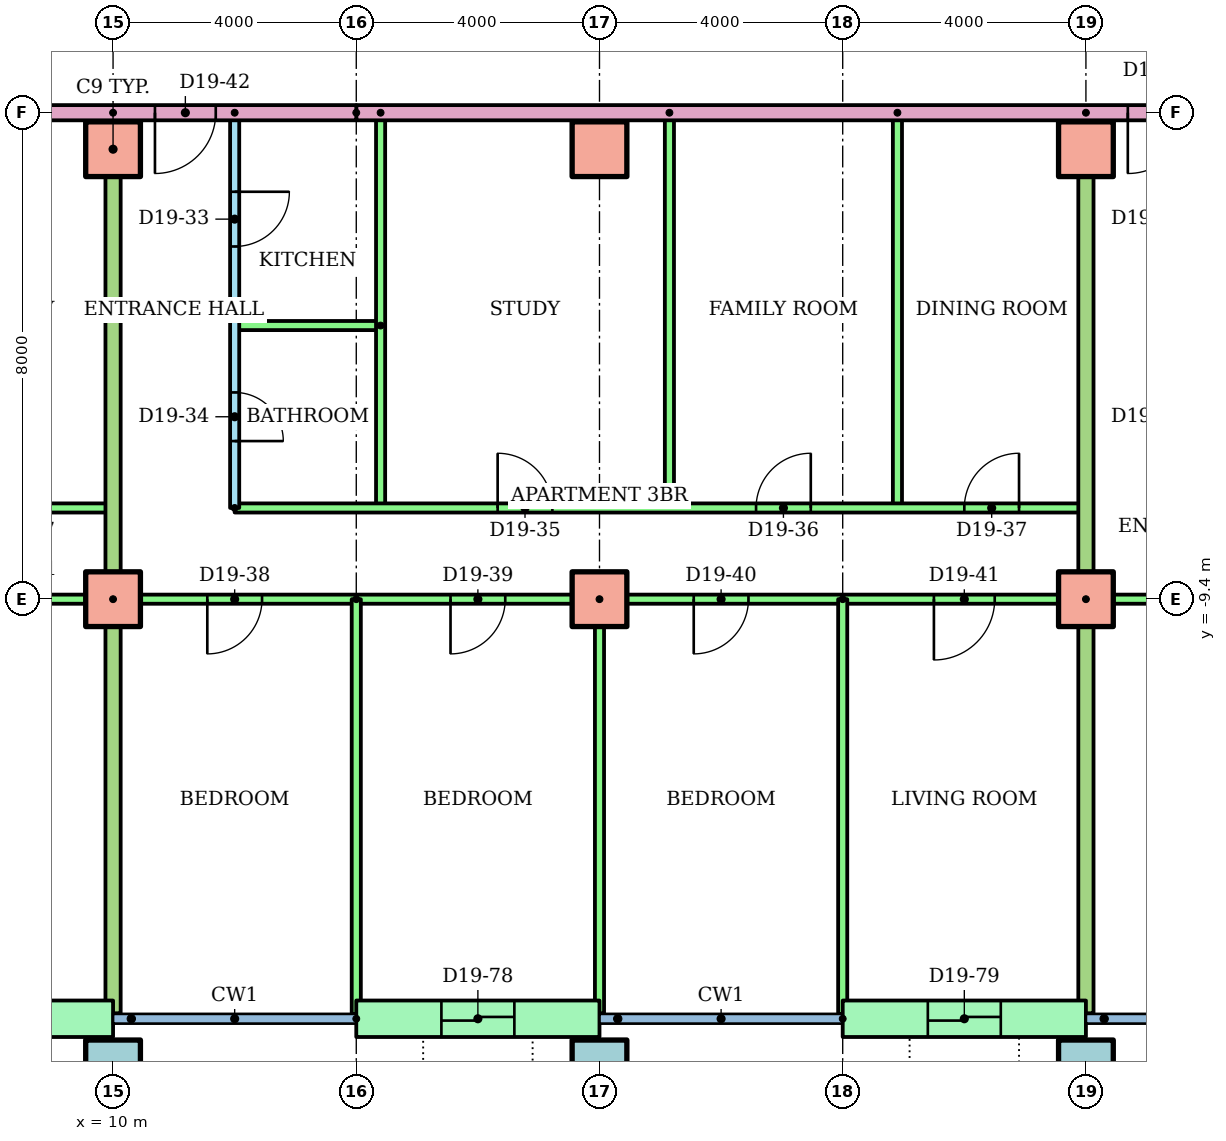
"""IFC4 building model, lengths in metres.
Left out: names, types, materials, properties, quantities, classifications, styles, units other than length and angle.
Written with IfcOpenShell. Run it as: python <this file> out.ifc"""

import sys

from ifc_helpers import new_model, si_unit, direction, frame, frame_2d, origin, origin_2d, place, context, subcontext, project, spatial, rectangle, hollow_rectangle, extrude, element, fill, save


model = new_model("IFC4")
c1 = context("Model", 3, precision=1e-05, world=origin(), true_north=direction((0.0, 1.0)))
c2 = subcontext(c1, "Body", "Model", "MODEL_VIEW")
j1 = project(units=[si_unit("LENGTHUNIT", "METRE"), si_unit("PLANEANGLEUNIT", "RADIAN")], contexts=[c1])
p1 = place(None, origin())
s1 = spatial("IfcSite", under=j1, at=p1, CompositionType="ELEMENT")
p2 = place(p1, origin())
s2 = spatial("IfcBuilding", under=s1, at=p2, CompositionType="ELEMENT")
p3 = place(p2, frame((0.0, 0.0, 77.5)))
s3 = spatial("IfcBuildingStorey", under=s2, at=p3, CompositionType="ELEMENT", Elevation=77.5)
for number, where in (
    (1, (10.0, -17.1, 0.0)),
    (2, (18.0, -17.1, 0.0)),
    (3, (26.0, -17.1, 0.0)),
):
    element("IfcColumn", number, at=place(p3, frame(where)), inside=s3, PredefinedType="COLUMN", context=c2, shape_type="SweptSolid", body=[
        extrude(hollow_rectangle(XDim=0.9, YDim=0.9, WallThickness=0.045, at=origin_2d()), origin(), (0.0, 0.0, 1.0), 3.2),
    ])
for number, where in (
    (4, (10.0, -9.4, 0.0)),
    (5, (18.0, -9.4, 0.0)),
    (6, (26.0, -9.4, 0.0)),
    (7, (10.0, -2.0, 0.0)),
    (8, (18.0, -2.0, 0.0)),
    (9, (26.0, -2.0, 0.0)),
):
    element("IfcColumn", number, at=place(p3, frame(where)), inside=s3, PredefinedType="COLUMN", context=c2, shape_type="SweptSolid", body=[
        extrude(rectangle(XDim=0.9, YDim=0.9, at=origin_2d()), origin(), (0.0, 0.0, 1.0), 3.2),
    ])
p4 = place(p3, frame((6.0, -16.3, 0.0)))
e10 = element("IfcWall", 10, at=p4, inside=s3, PredefinedType="STANDARD", context=c2, shape_type="SweptSolid", body=[
    extrude(rectangle(XDim=4.0, YDim=0.6, at=frame_2d((2.0, 0.0))), origin(), (0.0, 0.0, 1.0), 2.92),
])
p5 = place(p4, frame((1.4, 0.0, 0.0)))
e11 = element("IfcOpeningElement", 11, at=p5, cuts=e10, PredefinedType="OPENING", context=c2, shape_type="SweptSolid", body=[
    extrude(rectangle(XDim=1.2, YDim=2.1, at=frame_2d((0.6, 1.05))), frame((0.0, 0.31, 0.0), z_axis=(0.0, -1.0, 0.0), x_axis=(1.0, 0.0, 0.0)), (0.0, 0.0, 1.0), 0.62),
])
p6 = place(p3, frame((14.0, -16.3, 0.0)))
e12 = element("IfcWall", 12, at=p6, inside=s3, PredefinedType="STANDARD", context=c2, shape_type="SweptSolid", body=[
    extrude(rectangle(XDim=4.0, YDim=0.6, at=frame_2d((2.0, 0.0))), origin(), (0.0, 0.0, 1.0), 2.92),
])
p7 = place(p6, frame((1.4, 0.0, 0.0)))
e13 = element("IfcOpeningElement", 13, at=p7, cuts=e12, PredefinedType="OPENING", context=c2, shape_type="SweptSolid", body=[
    extrude(rectangle(XDim=1.2, YDim=2.1, at=frame_2d((0.6, 1.05))), frame((0.0, 0.31, 0.0), z_axis=(0.0, -1.0, 0.0), x_axis=(1.0, 0.0, 0.0)), (0.0, 0.0, 1.0), 0.62),
])
p8 = place(p3, frame((22.0, -16.3, 0.0)))
e14 = element("IfcWall", 14, at=p8, inside=s3, PredefinedType="STANDARD", context=c2, shape_type="SweptSolid", body=[
    extrude(rectangle(XDim=4.0, YDim=0.6, at=frame_2d((2.0, 0.0))), origin(), (0.0, 0.0, 1.0), 2.92),
])
p9 = place(p8, frame((1.4, 0.0, 0.0)))
e15 = element("IfcOpeningElement", 15, at=p9, cuts=e14, PredefinedType="OPENING", context=c2, shape_type="SweptSolid", body=[
    extrude(rectangle(XDim=1.2, YDim=2.1, at=frame_2d((0.6, 1.05))), frame((0.0, 0.31, 0.0), z_axis=(0.0, -1.0, 0.0), x_axis=(1.0, 0.0, 0.0)), (0.0, 0.0, 1.0), 0.62),
])
p10 = place(p3, frame((-4.0, -7.9, 0.0)))
e16 = element("IfcWall", 16, at=p10, inside=s3, PredefinedType="PARTITIONING", context=c2, shape_type="SweptSolid", body=[
    extrude(rectangle(XDim=14.0, YDim=0.15, at=frame_2d((7.0, 0.0))), origin(), (0.0, 0.0, 1.0), 2.4),
])
p11 = place(p10, frame((4.325, 0.0, 0.0)))
e17 = element("IfcOpeningElement", 17, at=p11, cuts=e16, PredefinedType="OPENING", context=c2, shape_type="SweptSolid", body=[
    extrude(rectangle(XDim=0.9, YDim=2.1, at=frame_2d((0.45, 1.05))), frame((0.0, 0.085, 0.0), z_axis=(0.0, -1.0, 0.0), x_axis=(1.0, 0.0, 0.0)), (0.0, 0.0, 1.0), 0.17),
])
p12 = place(p10, frame((8.575, 0.0, 0.0)))
e18 = element("IfcOpeningElement", 18, at=p12, cuts=e16, PredefinedType="OPENING", context=c2, shape_type="SweptSolid", body=[
    extrude(rectangle(XDim=0.9, YDim=2.1, at=frame_2d((0.45, 1.05))), frame((0.0, 0.085, 0.0), z_axis=(0.0, -1.0, 0.0), x_axis=(1.0, 0.0, 0.0)), (0.0, 0.0, 1.0), 0.17),
])
p13 = place(p10, frame((12.0, 0.0, 0.0)))
e19 = element("IfcOpeningElement", 19, at=p13, cuts=e16, PredefinedType="OPENING", context=c2, shape_type="SweptSolid", body=[
    extrude(rectangle(XDim=0.9, YDim=2.1, at=frame_2d((0.45, 1.05))), frame((0.0, 0.085, 0.0), z_axis=(0.0, -1.0, 0.0), x_axis=(1.0, 0.0, 0.0)), (0.0, 0.0, 1.0), 0.17),
])
p14 = place(p3, frame((10.0, -9.4, 0.0), z_axis=(0.0, 0.0, 1.0), x_axis=(-1.0, 0.0, 0.0)))
e20 = element("IfcWall", 20, at=p14, inside=s3, PredefinedType="PARTITIONING", context=c2, shape_type="SweptSolid", body=[
    extrude(rectangle(XDim=16.0, YDim=0.15, at=frame_2d((8.0, 0.0))), origin(), (0.0, 0.0, 1.0), 2.4),
])
p15 = place(p14, frame((13.55, 0.0, 0.0)))
e21 = element("IfcOpeningElement", 21, at=p15, cuts=e20, PredefinedType="OPENING", context=c2, shape_type="SweptSolid", body=[
    extrude(rectangle(XDim=0.9, YDim=2.1, at=frame_2d((0.45, 1.05))), frame((0.0, 0.085, 0.0), z_axis=(0.0, -1.0, 0.0), x_axis=(1.0, 0.0, 0.0)), (0.0, 0.0, 1.0), 0.17),
])
p16 = place(p14, frame((9.5, 0.0, 0.0)))
e22 = element("IfcOpeningElement", 22, at=p16, cuts=e20, PredefinedType="OPENING", context=c2, shape_type="SweptSolid", body=[
    extrude(rectangle(XDim=1.0, YDim=2.1, at=frame_2d((0.5, 1.05))), frame((0.0, 0.085, 0.0), z_axis=(0.0, -1.0, 0.0), x_axis=(1.0, 0.0, 0.0)), (0.0, 0.0, 1.0), 0.17),
])
p17 = place(p14, frame((5.55, 0.0, 0.0)))
e23 = element("IfcOpeningElement", 23, at=p17, cuts=e20, PredefinedType="OPENING", context=c2, shape_type="SweptSolid", body=[
    extrude(rectangle(XDim=0.9, YDim=2.1, at=frame_2d((0.45, 1.05))), frame((0.0, 0.085, 0.0), z_axis=(0.0, -1.0, 0.0), x_axis=(1.0, 0.0, 0.0)), (0.0, 0.0, 1.0), 0.17),
])
p18 = place(p14, frame((1.55, 0.0, 0.0)))
e24 = element("IfcOpeningElement", 24, at=p18, cuts=e20, PredefinedType="OPENING", context=c2, shape_type="SweptSolid", body=[
    extrude(rectangle(XDim=0.9, YDim=2.1, at=frame_2d((0.45, 1.05))), frame((0.0, 0.085, 0.0), z_axis=(0.0, -1.0, 0.0), x_axis=(1.0, 0.0, 0.0)), (0.0, 0.0, 1.0), 0.17),
])
p19 = place(p3, frame((12.0, -1.4, 0.0), z_axis=(0.0, 0.0, 1.0), x_axis=(0.0, -1.0, 0.0)))
e25 = element("IfcWall", 25, at=p19, inside=s3, PredefinedType="PARTITIONING", context=c2, shape_type="SweptSolid", body=[
    extrude(rectangle(XDim=6.5, YDim=0.15, at=frame_2d((3.25, 0.0))), origin(), (0.0, 0.0, 1.0), 2.4),
])
p20 = place(p19, frame((1.3, 0.0, 0.0)))
e26 = element("IfcOpeningElement", 26, at=p20, cuts=e25, PredefinedType="OPENING", context=c2, shape_type="SweptSolid", body=[
    extrude(rectangle(XDim=0.9, YDim=2.1, at=frame_2d((0.45, 1.05))), frame((0.0, 0.085, 0.0), z_axis=(0.0, -1.0, 0.0), x_axis=(1.0, 0.0, 0.0)), (0.0, 0.0, 1.0), 0.17),
])
p21 = place(p19, frame((4.6, 0.0, 0.0)))
e27 = element("IfcOpeningElement", 27, at=p21, cuts=e25, PredefinedType="OPENING", context=c2, shape_type="SweptSolid", body=[
    extrude(rectangle(XDim=0.8, YDim=2.1, at=frame_2d((0.4, 1.05))), frame((0.0, 0.085, 0.0), z_axis=(0.0, -1.0, 0.0), x_axis=(1.0, 0.0, 0.0)), (0.0, 0.0, 1.0), 0.17),
])
p22 = place(p3, frame((14.4, -4.9, 0.0), z_axis=(0.0, 0.0, 1.0), x_axis=(-1.0, 0.0, 0.0)))
e28 = element("IfcWall", 28, at=p22, inside=s3, PredefinedType="PARTITIONING", context=c2, shape_type="SweptSolid", body=[
    extrude(rectangle(XDim=2.4, YDim=0.15, at=frame_2d((1.2, 0.0))), origin(), (0.0, 0.0, 1.0), 2.4),
])
for number, where, z_axis, x_axis in (
    (29, (14.4, -1.4, 0.0), (0.0, 0.0, 1.0), (0.0, -1.0, 0.0)),
    (30, (19.15, -1.4, 0.0), (0.0, 0.0, 1.0), (0.0, -1.0, 0.0)),
    (31, (22.9, -1.4, 0.0), (0.0, 0.0, 1.0), (0.0, -1.0, 0.0)),
):
    element("IfcWall", number, at=place(p3, frame(where, z_axis=z_axis, x_axis=x_axis)), inside=s3, PredefinedType="PARTITIONING", context=c2, shape_type="SweptSolid", body=[
        extrude(rectangle(XDim=6.5, YDim=0.15, at=frame_2d((3.25, 0.0))), origin(), (0.0, 0.0, 1.0), 2.4),
    ])
p23 = place(p3, frame((12.0, -7.9, 0.0)))
e32 = element("IfcWall", 32, at=p23, inside=s3, PredefinedType="PARTITIONING", context=c2, shape_type="SweptSolid", body=[
    extrude(rectangle(XDim=14.0, YDim=0.15, at=frame_2d((7.0, 0.0))), origin(), (0.0, 0.0, 1.0), 2.4),
])
p24 = place(p23, frame((4.325, 0.0, 0.0)))
e33 = element("IfcOpeningElement", 33, at=p24, cuts=e32, PredefinedType="OPENING", context=c2, shape_type="SweptSolid", body=[
    extrude(rectangle(XDim=0.9, YDim=2.1, at=frame_2d((0.45, 1.05))), frame((0.0, 0.085, 0.0), z_axis=(0.0, -1.0, 0.0), x_axis=(1.0, 0.0, 0.0)), (0.0, 0.0, 1.0), 0.17),
])
p25 = place(p23, frame((8.575, 0.0, 0.0)))
e34 = element("IfcOpeningElement", 34, at=p25, cuts=e32, PredefinedType="OPENING", context=c2, shape_type="SweptSolid", body=[
    extrude(rectangle(XDim=0.9, YDim=2.1, at=frame_2d((0.45, 1.05))), frame((0.0, 0.085, 0.0), z_axis=(0.0, -1.0, 0.0), x_axis=(1.0, 0.0, 0.0)), (0.0, 0.0, 1.0), 0.17),
])
p26 = place(p23, frame((12.0, 0.0, 0.0)))
e35 = element("IfcOpeningElement", 35, at=p26, cuts=e32, PredefinedType="OPENING", context=c2, shape_type="SweptSolid", body=[
    extrude(rectangle(XDim=0.9, YDim=2.1, at=frame_2d((0.45, 1.05))), frame((0.0, 0.085, 0.0), z_axis=(0.0, -1.0, 0.0), x_axis=(1.0, 0.0, 0.0)), (0.0, 0.0, 1.0), 0.17),
])
p27 = place(p3, frame((26.0, -9.4, 0.0), z_axis=(0.0, 0.0, 1.0), x_axis=(-1.0, 0.0, 0.0)))
e36 = element("IfcWall", 36, at=p27, inside=s3, PredefinedType="PARTITIONING", context=c2, shape_type="SweptSolid", body=[
    extrude(rectangle(XDim=16.0, YDim=0.15, at=frame_2d((8.0, 0.0))), origin(), (0.0, 0.0, 1.0), 2.4),
])
p28 = place(p27, frame((13.55, 0.0, 0.0)))
e37 = element("IfcOpeningElement", 37, at=p28, cuts=e36, PredefinedType="OPENING", context=c2, shape_type="SweptSolid", body=[
    extrude(rectangle(XDim=0.9, YDim=2.1, at=frame_2d((0.45, 1.05))), frame((0.0, 0.085, 0.0), z_axis=(0.0, -1.0, 0.0), x_axis=(1.0, 0.0, 0.0)), (0.0, 0.0, 1.0), 0.17),
])
p29 = place(p27, frame((9.55, 0.0, 0.0)))
e38 = element("IfcOpeningElement", 38, at=p29, cuts=e36, PredefinedType="OPENING", context=c2, shape_type="SweptSolid", body=[
    extrude(rectangle(XDim=0.9, YDim=2.1, at=frame_2d((0.45, 1.05))), frame((0.0, 0.085, 0.0), z_axis=(0.0, -1.0, 0.0), x_axis=(1.0, 0.0, 0.0)), (0.0, 0.0, 1.0), 0.17),
])
p30 = place(p27, frame((5.55, 0.0, 0.0)))
e39 = element("IfcOpeningElement", 39, at=p30, cuts=e36, PredefinedType="OPENING", context=c2, shape_type="SweptSolid", body=[
    extrude(rectangle(XDim=0.9, YDim=2.1, at=frame_2d((0.45, 1.05))), frame((0.0, 0.085, 0.0), z_axis=(0.0, -1.0, 0.0), x_axis=(1.0, 0.0, 0.0)), (0.0, 0.0, 1.0), 0.17),
])
p31 = place(p27, frame((1.5, 0.0, 0.0)))
e40 = element("IfcOpeningElement", 40, at=p31, cuts=e36, PredefinedType="OPENING", context=c2, shape_type="SweptSolid", body=[
    extrude(rectangle(XDim=1.0, YDim=2.1, at=frame_2d((0.5, 1.05))), frame((0.0, 0.085, 0.0), z_axis=(0.0, -1.0, 0.0), x_axis=(1.0, 0.0, 0.0)), (0.0, 0.0, 1.0), 0.17),
])
p32 = place(p3, frame((14.0, -9.4, 0.0), z_axis=(0.0, 0.0, 1.0), x_axis=(0.0, -1.0, 0.0)))
e41 = element("IfcWall", 41, at=p32, inside=s3, PredefinedType="PARTITIONING", context=c2, shape_type="SweptSolid", body=[
    extrude(rectangle(XDim=6.821, YDim=0.15, at=frame_2d((3.411, 0.0))), origin(), (0.0, 0.0, 1.0), 2.4),
])
p33 = place(p3, frame((18.0, -9.4, 0.0), z_axis=(0.0, 0.0, 1.0), x_axis=(0.0, -1.0, 0.0)))
e42 = element("IfcWall", 42, at=p33, inside=s3, PredefinedType="PARTITIONING", context=c2, shape_type="SweptSolid", body=[
    extrude(rectangle(XDim=6.81, YDim=0.15, at=frame_2d((3.405, 0.0))), origin(), (0.0, 0.0, 1.0), 2.4),
])
p34 = place(p3, frame((22.0, -9.4, 0.0), z_axis=(0.0, 0.0, 1.0), x_axis=(0.0, -1.0, 0.0)))
e43 = element("IfcWall", 43, at=p34, inside=s3, PredefinedType="PARTITIONING", context=c2, shape_type="SweptSolid", body=[
    extrude(rectangle(XDim=6.821, YDim=0.15, at=frame_2d((3.411, 0.0))), origin(), (0.0, 0.0, 1.0), 2.4),
])
p35 = place(p3, frame((10.0, -1.4, 0.0), z_axis=(0.0, 0.0, 1.0), x_axis=(0.0, -1.0, 0.0)))
e44 = element("IfcWall", 44, at=p35, inside=s3, PredefinedType="PARTITIONING", context=c2, shape_type="SweptSolid", body=[
    extrude(rectangle(XDim=14.81, YDim=0.25, at=frame_2d((7.405, 0.0))), origin(), (0.0, 0.0, 1.0), 2.4),
])
p36 = place(p3, frame((40.62, -9.4, 0.0), z_axis=(0.0, 0.0, 1.0), x_axis=(-1.0, 0.0, 0.0)))
e45 = element("IfcWall", 45, at=p36, inside=s3, PredefinedType="PARTITIONING", context=c2, shape_type="SweptSolid", body=[
    extrude(rectangle(XDim=14.62, YDim=0.15, at=frame_2d((7.31, 0.0))), origin(), (0.0, 0.0, 1.0), 2.4),
])
p37 = place(p36, frame((10.12, 0.0, 0.0)))
e46 = element("IfcOpeningElement", 46, at=p37, cuts=e45, PredefinedType="OPENING", context=c2, shape_type="SweptSolid", body=[
    extrude(rectangle(XDim=1.0, YDim=2.1, at=frame_2d((0.5, 1.05))), frame((0.0, 0.085, 0.0), z_axis=(0.0, -1.0, 0.0), x_axis=(1.0, 0.0, 0.0)), (0.0, 0.0, 1.0), 0.17),
])
p38 = place(p36, frame((2.97, 0.0, 0.0)))
e47 = element("IfcOpeningElement", 47, at=p38, cuts=e45, PredefinedType="OPENING", context=c2, shape_type="SweptSolid", body=[
    extrude(rectangle(XDim=0.9, YDim=2.1, at=frame_2d((0.45, 1.05))), frame((0.0, 0.085, 0.0), z_axis=(0.0, -1.0, 0.0), x_axis=(1.0, 0.0, 0.0)), (0.0, 0.0, 1.0), 0.17),
])
p39 = place(p3, frame((26.0, -1.4, 0.0), z_axis=(0.0, 0.0, 1.0), x_axis=(0.0, -1.0, 0.0)))
e48 = element("IfcWall", 48, at=p39, inside=s3, PredefinedType="PARTITIONING", context=c2, shape_type="SweptSolid", body=[
    extrude(rectangle(XDim=14.81, YDim=0.25, at=frame_2d((7.405, 0.0))), origin(), (0.0, 0.0, 1.0), 2.4),
])
p40 = place(p3, frame((29.0, -1.4, 0.0), z_axis=(0.0, 0.0, 1.0), x_axis=(-1.0, 0.0, 0.0)))
e49 = element("IfcWall", 49, at=p40, inside=s3, PredefinedType="PARTITIONING", context=c2, shape_type="SweptSolid", body=[
    extrude(rectangle(XDim=15.0, YDim=0.25, at=frame_2d((7.5, 0.0))), origin(), (0.0, 0.0, 1.0), 2.4),
])
p41 = place(p40, frame((1.311, 0.0, 0.0)))
e50 = element("IfcOpeningElement", 50, at=p41, cuts=e49, PredefinedType="OPENING", context=c2, shape_type="SweptSolid", body=[
    extrude(rectangle(XDim=1.0, YDim=2.1, at=frame_2d((0.5, 1.05))), frame((0.0, 0.135, 0.0), z_axis=(0.0, -1.0, 0.0), x_axis=(1.0, 0.0, 0.0)), (0.0, 0.0, 1.0), 0.27),
])
p42 = place(p3, frame((14.0, -1.4, 0.0), z_axis=(0.0, 0.0, 1.0), x_axis=(-1.0, 0.0, 0.0)))
e51 = element("IfcWall", 51, at=p42, inside=s3, PredefinedType="PARTITIONING", context=c2, shape_type="SweptSolid", body=[
    extrude(rectangle(XDim=28.0, YDim=0.25, at=frame_2d((14.0, 0.0))), origin(), (0.0, 0.0, 1.0), 2.4),
])
p43 = place(p42, frame((20.689, 0.0, 0.0)))
e52 = element("IfcOpeningElement", 52, at=p43, cuts=e51, PredefinedType="OPENING", context=c2, shape_type="SweptSolid", body=[
    extrude(rectangle(XDim=1.0, YDim=2.1, at=frame_2d((0.5, 1.05))), frame((0.0, 0.135, 0.0), z_axis=(0.0, -1.0, 0.0), x_axis=(1.0, 0.0, 0.0)), (0.0, 0.0, 1.0), 0.27),
])
p44 = place(p42, frame((18.311, 0.0, 0.0)))
e53 = element("IfcOpeningElement", 53, at=p44, cuts=e51, PredefinedType="OPENING", context=c2, shape_type="SweptSolid", body=[
    extrude(rectangle(XDim=1.0, YDim=2.1, at=frame_2d((0.5, 1.05))), frame((0.0, 0.135, 0.0), z_axis=(0.0, -1.0, 0.0), x_axis=(1.0, 0.0, 0.0)), (0.0, 0.0, 1.0), 0.27),
])
p45 = place(p42, frame((2.311, 0.0, 0.0)))
e54 = element("IfcOpeningElement", 54, at=p45, cuts=e51, PredefinedType="OPENING", context=c2, shape_type="SweptSolid", body=[
    extrude(rectangle(XDim=1.0, YDim=2.1, at=frame_2d((0.5, 1.05))), frame((0.0, 0.135, 0.0), z_axis=(0.0, -1.0, 0.0), x_axis=(1.0, 0.0, 0.0)), (0.0, 0.0, 1.0), 0.27),
])
p46 = place(p20, origin())
e55 = element("IfcDoor", 55, at=p46, inside=s3, OperationType="SINGLE_SWING_LEFT", PredefinedType="DOOR", context=c2, shape_type="SweptSolid", body=[
    extrude(rectangle(XDim=0.9, YDim=2.1, at=frame_2d((0.45, 1.05))), frame((0.0, 0.025, 0.0), z_axis=(0.0, -1.0, 0.0), x_axis=(1.0, 0.0, 0.0)), (0.0, 0.0, 1.0), 0.05),
])
fill(e26, e55)
p47 = place(p21, origin())
e56 = element("IfcDoor", 56, at=p47, inside=s3, OperationType="SINGLE_SWING_RIGHT", PredefinedType="DOOR", context=c2, shape_type="SweptSolid", body=[
    extrude(rectangle(XDim=0.8, YDim=2.1, at=frame_2d((0.4, 1.05))), frame((0.0, 0.025, 0.0), z_axis=(0.0, -1.0, 0.0), x_axis=(1.0, 0.0, 0.0)), (0.0, 0.0, 1.0), 0.05),
])
fill(e27, e56)
p48 = place(p24, origin())
e57 = element("IfcDoor", 57, at=p48, inside=s3, OperationType="SINGLE_SWING_LEFT", PredefinedType="DOOR", context=c2, shape_type="SweptSolid", body=[
    extrude(rectangle(XDim=0.9, YDim=2.1, at=frame_2d((0.45, 1.05))), frame((0.0, 0.025, 0.0), z_axis=(0.0, -1.0, 0.0), x_axis=(1.0, 0.0, 0.0)), (0.0, 0.0, 1.0), 0.05),
])
fill(e33, e57)
p49 = place(p25, origin())
e58 = element("IfcDoor", 58, at=p49, inside=s3, OperationType="SINGLE_SWING_RIGHT", PredefinedType="DOOR", context=c2, shape_type="SweptSolid", body=[
    extrude(rectangle(XDim=0.9, YDim=2.1, at=frame_2d((0.45, 1.05))), frame((0.0, 0.025, 0.0), z_axis=(0.0, -1.0, 0.0), x_axis=(1.0, 0.0, 0.0)), (0.0, 0.0, 1.0), 0.05),
])
fill(e34, e58)
p50 = place(p26, origin())
e59 = element("IfcDoor", 59, at=p50, inside=s3, OperationType="SINGLE_SWING_RIGHT", PredefinedType="DOOR", context=c2, shape_type="SweptSolid", body=[
    extrude(rectangle(XDim=0.9, YDim=2.1, at=frame_2d((0.45, 1.05))), frame((0.0, 0.025, 0.0), z_axis=(0.0, -1.0, 0.0), x_axis=(1.0, 0.0, 0.0)), (0.0, 0.0, 1.0), 0.05),
])
fill(e35, e59)
p51 = place(p28, origin())
e60 = element("IfcDoor", 60, at=p51, inside=s3, OperationType="SINGLE_SWING_RIGHT", PredefinedType="DOOR", context=c2, shape_type="SweptSolid", body=[
    extrude(rectangle(XDim=0.9, YDim=2.1, at=frame_2d((0.45, 1.05))), frame((0.0, 0.025, 0.0), z_axis=(0.0, -1.0, 0.0), x_axis=(1.0, 0.0, 0.0)), (0.0, 0.0, 1.0), 0.05),
])
fill(e37, e60)
p52 = place(p29, origin())
e61 = element("IfcDoor", 61, at=p52, inside=s3, OperationType="SINGLE_SWING_RIGHT", PredefinedType="DOOR", context=c2, shape_type="SweptSolid", body=[
    extrude(rectangle(XDim=0.9, YDim=2.1, at=frame_2d((0.45, 1.05))), frame((0.0, 0.025, 0.0), z_axis=(0.0, -1.0, 0.0), x_axis=(1.0, 0.0, 0.0)), (0.0, 0.0, 1.0), 0.05),
])
fill(e38, e61)
p53 = place(p30, origin())
e62 = element("IfcDoor", 62, at=p53, inside=s3, OperationType="SINGLE_SWING_RIGHT", PredefinedType="DOOR", context=c2, shape_type="SweptSolid", body=[
    extrude(rectangle(XDim=0.9, YDim=2.1, at=frame_2d((0.45, 1.05))), frame((0.0, 0.025, 0.0), z_axis=(0.0, -1.0, 0.0), x_axis=(1.0, 0.0, 0.0)), (0.0, 0.0, 1.0), 0.05),
])
fill(e39, e62)
p54 = place(p31, origin())
e63 = element("IfcDoor", 63, at=p54, inside=s3, OperationType="SINGLE_SWING_RIGHT", PredefinedType="DOOR", context=c2, shape_type="SweptSolid", body=[
    extrude(rectangle(XDim=1.0, YDim=2.1, at=frame_2d((0.5, 1.05))), frame((0.0, 0.025, 0.0), z_axis=(0.0, -1.0, 0.0), x_axis=(1.0, 0.0, 0.0)), (0.0, 0.0, 1.0), 0.05),
])
fill(e40, e63)
p55 = place(p45, origin())
e64 = element("IfcDoor", 64, at=p55, inside=s3, OperationType="SINGLE_SWING_RIGHT", PredefinedType="DOOR", context=c2, shape_type="SweptSolid", body=[
    extrude(rectangle(XDim=1.0, YDim=2.1, at=frame_2d((0.5, 1.05))), frame((0.0, 0.025, 0.0), z_axis=(0.0, -1.0, 0.0), x_axis=(1.0, 0.0, 0.0)), (0.0, 0.0, 1.0), 0.05),
])
fill(e54, e64)
p56 = place(p41, origin())
e65 = element("IfcDoor", 65, at=p56, inside=s3, OperationType="SINGLE_SWING_RIGHT", PredefinedType="DOOR", context=c2, shape_type="SweptSolid", body=[
    extrude(rectangle(XDim=1.0, YDim=2.1, at=frame_2d((0.5, 1.05))), frame((0.0, 0.025, 0.0), z_axis=(0.0, -1.0, 0.0), x_axis=(1.0, 0.0, 0.0)), (0.0, 0.0, 1.0), 0.05),
])
fill(e50, e65)
p57 = place(p7, origin())
e66 = element("IfcDoor", 66, at=p57, inside=s3, OperationType="SLIDING_TO_LEFT", PredefinedType="DOOR", context=c2, shape_type="SweptSolid", body=[
    extrude(rectangle(XDim=1.2, YDim=2.1, at=frame_2d((0.6, 1.05))), frame((0.0, 0.025, 0.0), z_axis=(0.0, -1.0, 0.0), x_axis=(1.0, 0.0, 0.0)), (0.0, 0.0, 1.0), 0.05),
])
fill(e13, e66)
p58 = place(p9, origin())
e67 = element("IfcDoor", 67, at=p58, inside=s3, OperationType="SLIDING_TO_LEFT", PredefinedType="DOOR", context=c2, shape_type="SweptSolid", body=[
    extrude(rectangle(XDim=1.2, YDim=2.1, at=frame_2d((0.6, 1.05))), frame((0.0, 0.025, 0.0), z_axis=(0.0, -1.0, 0.0), x_axis=(1.0, 0.0, 0.0)), (0.0, 0.0, 1.0), 0.05),
])
fill(e15, e67)
save(model, sys.argv[1])
